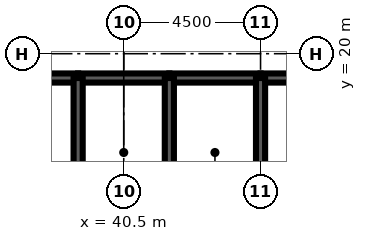
"""IFC4 building model, lengths in metres.
Left out: names, types, materials, properties, quantities, classifications, styles, units other than length and angle.
Written with IfcOpenShell. Run it as: python <this file> out.ifc"""

import sys

from ifc_helpers import new_model, si_unit, direction, frame, frame_2d, origin, place, context, subcontext, project, spatial, rectangle, extrude, element, fill, save


model = new_model("IFC4")
c1 = context("Model", 3, precision=1e-05, world=origin(), true_north=direction((0.0, 1.0)))
c2 = subcontext(c1, "Body", "Model", "MODEL_VIEW")
j1 = project(units=[si_unit("LENGTHUNIT", "METRE"), si_unit("PLANEANGLEUNIT", "RADIAN")], contexts=[c1])
p1 = place(None, origin())
s1 = spatial("IfcSite", under=j1, at=p1, CompositionType="ELEMENT")
p2 = place(p1, origin())
s2 = spatial("IfcBuilding", under=s1, at=p2, CompositionType="ELEMENT")
p3 = place(p2, frame((0.0, 0.0, 308.9)))
s3 = spatial("IfcBuildingStorey", under=s2, at=p3, CompositionType="ELEMENT", Elevation=308.9)
p4 = place(p3, frame((36.0, 19.2, 0.0), z_axis=(0.0, 0.0, 1.0), x_axis=(1.0, 0.0, 0.0)))
e1 = element("IfcWall", 1, at=p4, inside=s3, PredefinedType="SOLIDWALL", context=c2, shape_type="SweptSolid", body=[
    extrude(rectangle(XDim=3.0, YDim=0.3, at=frame_2d((1.5, 0.0))), origin(), (0.0, 0.0, 1.0), 4.2),
])
p5 = place(p4, frame((0.95, 0.0, 0.0)))
e2 = element("IfcOpeningElement", 2, at=p5, cuts=e1, PredefinedType="OPENING", context=c2, shape_type="SweptSolid", body=[
    extrude(rectangle(XDim=1.1, YDim=2.2, at=frame_2d((0.55, 1.1))), frame((0.0, 0.16, 0.0), z_axis=(0.0, -1.0, 0.0), x_axis=(1.0, 0.0, 0.0)), (0.0, 0.0, 1.0), 0.32),
])
p6 = place(p3, frame((39.0, 19.2, 0.0), z_axis=(0.0, 0.0, 1.0), x_axis=(1.0, 0.0, 0.0)))
e3 = element("IfcWall", 3, at=p6, inside=s3, PredefinedType="SOLIDWALL", context=c2, shape_type="SweptSolid", body=[
    extrude(rectangle(XDim=3.0, YDim=0.3, at=frame_2d((1.5, 0.0))), origin(), (0.0, 0.0, 1.0), 4.2),
])
p7 = place(p6, frame((1.0, 0.0, 0.0)))
e4 = element("IfcOpeningElement", 4, at=p7, cuts=e3, PredefinedType="OPENING", context=c2, shape_type="SweptSolid", body=[
    extrude(rectangle(XDim=1.0, YDim=2.1, at=frame_2d((0.5, 1.05))), frame((0.0, 0.16, 0.0), z_axis=(0.0, -1.0, 0.0), x_axis=(1.0, 0.0, 0.0)), (0.0, 0.0, 1.0), 0.32),
])
p8 = place(p3, frame((42.0, 19.2, 0.0), z_axis=(0.0, 0.0, 1.0), x_axis=(1.0, 0.0, 0.0)))
e5 = element("IfcWall", 5, at=p8, inside=s3, PredefinedType="SOLIDWALL", context=c2, shape_type="SweptSolid", body=[
    extrude(rectangle(XDim=3.0, YDim=0.3, at=frame_2d((1.5, 0.0))), origin(), (0.0, 0.0, 1.0), 4.2),
])
p9 = place(p8, frame((1.0, 0.0, 0.0)))
e6 = element("IfcOpeningElement", 6, at=p9, cuts=e5, PredefinedType="OPENING", context=c2, shape_type="SweptSolid", body=[
    extrude(rectangle(XDim=1.0, YDim=2.1, at=frame_2d((0.5, 1.05))), frame((0.0, 0.16, 0.0), z_axis=(0.0, -1.0, 0.0), x_axis=(1.0, 0.0, 0.0)), (0.0, 0.0, 1.0), 0.32),
])
p10 = place(p3, frame((45.0, 19.2, 0.0), z_axis=(0.0, 0.0, 1.0), x_axis=(1.0, 0.0, 0.0)))
e7 = element("IfcWall", 7, at=p10, inside=s3, PredefinedType="SOLIDWALL", context=c2, shape_type="SweptSolid", body=[
    extrude(rectangle(XDim=9.0, YDim=0.3, at=frame_2d((4.5, 0.0))), origin(), (0.0, 0.0, 1.0), 4.2),
])
p11 = place(p10, frame((7.35, 0.0, 0.0)))
e8 = element("IfcOpeningElement", 8, at=p11, cuts=e7, PredefinedType="OPENING", context=c2, shape_type="SweptSolid", body=[
    extrude(rectangle(XDim=1.0, YDim=2.1, at=frame_2d((0.5, 1.05))), frame((0.0, 0.16, 0.0), z_axis=(0.0, -1.0, 0.0), x_axis=(1.0, 0.0, 0.0)), (0.0, 0.0, 1.0), 0.32),
])
for number, where, z_axis, x_axis in (
    (9, (39.0, 16.0, 0.0), (0.0, 0.0, 1.0), (0.0, 1.0, 0.0)),
    (10, (42.0, 16.0, 0.0), (0.0, 0.0, 1.0), (0.0, 1.0, 0.0)),
    (11, (45.0, 16.0, 0.0), (0.0, 0.0, 1.0), (0.0, 1.0, 0.0)),
):
    element("IfcWall", number, at=place(p3, frame(where, z_axis=z_axis, x_axis=x_axis)), inside=s3, PredefinedType="SOLIDWALL", context=c2, shape_type="SweptSolid", body=[
        extrude(rectangle(XDim=3.2, YDim=0.3, at=frame_2d((1.6, 0.0))), origin(), (0.0, 0.0, 1.0), 4.2),
    ])
p12 = place(p3, frame((39.15, 17.3, 0.0), z_axis=(0.0, 0.0, 1.0), x_axis=(1.0, 0.0, 0.0)))
e12 = element("IfcWall", 12, at=p12, inside=s3, PredefinedType="SOLIDWALL", context=c2, shape_type="SweptSolid", body=[
    extrude(rectangle(XDim=2.7, YDim=0.3, at=frame_2d((1.35, 0.0))), origin(), (0.0, 0.0, 1.0), 4.04),
])
p13 = place(p12, frame((0.85, 0.0, 0.0)))
e13 = element("IfcOpeningElement", 13, at=p13, cuts=e12, PredefinedType="OPENING", context=c2, shape_type="SweptSolid", body=[
    extrude(rectangle(XDim=1.0, YDim=2.1, at=frame_2d((0.5, 1.05))), frame((0.0, 0.16, 0.0), z_axis=(0.0, -1.0, 0.0), x_axis=(1.0, 0.0, 0.0)), (0.0, 0.0, 1.0), 0.32),
])
p14 = place(p3, frame((42.15, 17.3, 0.0), z_axis=(0.0, 0.0, 1.0), x_axis=(1.0, 0.0, 0.0)))
e14 = element("IfcWall", 14, at=p14, inside=s3, PredefinedType="SOLIDWALL", context=c2, shape_type="SweptSolid", body=[
    extrude(rectangle(XDim=2.7, YDim=0.3, at=frame_2d((1.35, 0.0))), origin(), (0.0, 0.0, 1.0), 4.04),
])
p15 = place(p14, frame((0.85, 0.0, 0.0)))
e15 = element("IfcOpeningElement", 15, at=p15, cuts=e14, PredefinedType="OPENING", context=c2, shape_type="SweptSolid", body=[
    extrude(rectangle(XDim=1.0, YDim=2.1, at=frame_2d((0.5, 1.05))), frame((0.0, 0.16, 0.0), z_axis=(0.0, -1.0, 0.0), x_axis=(1.0, 0.0, 0.0)), (0.0, 0.0, 1.0), 0.32),
])
p16 = place(p13, origin())
e16 = element("IfcDoor", 16, at=p16, inside=s3, OperationType="SINGLE_SWING_LEFT", PredefinedType="DOOR", context=c2, shape_type="SweptSolid", body=[
    extrude(rectangle(XDim=1.0, YDim=2.1, at=frame_2d((0.5, 1.05))), frame((0.0, 0.025, 0.0), z_axis=(0.0, -1.0, 0.0), x_axis=(1.0, 0.0, 0.0)), (0.0, 0.0, 1.0), 0.05),
])
fill(e13, e16)
p17 = place(p15, origin())
e17 = element("IfcDoor", 17, at=p17, inside=s3, OperationType="SINGLE_SWING_LEFT", PredefinedType="DOOR", context=c2, shape_type="SweptSolid", body=[
    extrude(rectangle(XDim=1.0, YDim=2.1, at=frame_2d((0.5, 1.05))), frame((0.0, 0.025, 0.0), z_axis=(0.0, -1.0, 0.0), x_axis=(1.0, 0.0, 0.0)), (0.0, 0.0, 1.0), 0.05),
])
fill(e15, e17)
p18 = place(p7, origin())
e18 = element("IfcDoor", 18, at=p18, inside=s3, OperationType="SINGLE_SWING_LEFT", PredefinedType="DOOR", context=c2, shape_type="SweptSolid", body=[
    extrude(rectangle(XDim=1.0, YDim=2.1, at=frame_2d((0.5, 1.05))), frame((0.0, 0.025, 0.0), z_axis=(0.0, -1.0, 0.0), x_axis=(1.0, 0.0, 0.0)), (0.0, 0.0, 1.0), 0.05),
])
fill(e4, e18)
p19 = place(p9, origin())
e19 = element("IfcDoor", 19, at=p19, inside=s3, OperationType="SINGLE_SWING_LEFT", PredefinedType="DOOR", context=c2, shape_type="SweptSolid", body=[
    extrude(rectangle(XDim=1.0, YDim=2.1, at=frame_2d((0.5, 1.05))), frame((0.0, 0.025, 0.0), z_axis=(0.0, -1.0, 0.0), x_axis=(1.0, 0.0, 0.0)), (0.0, 0.0, 1.0), 0.05),
])
fill(e6, e19)
save(model, sys.argv[1])
